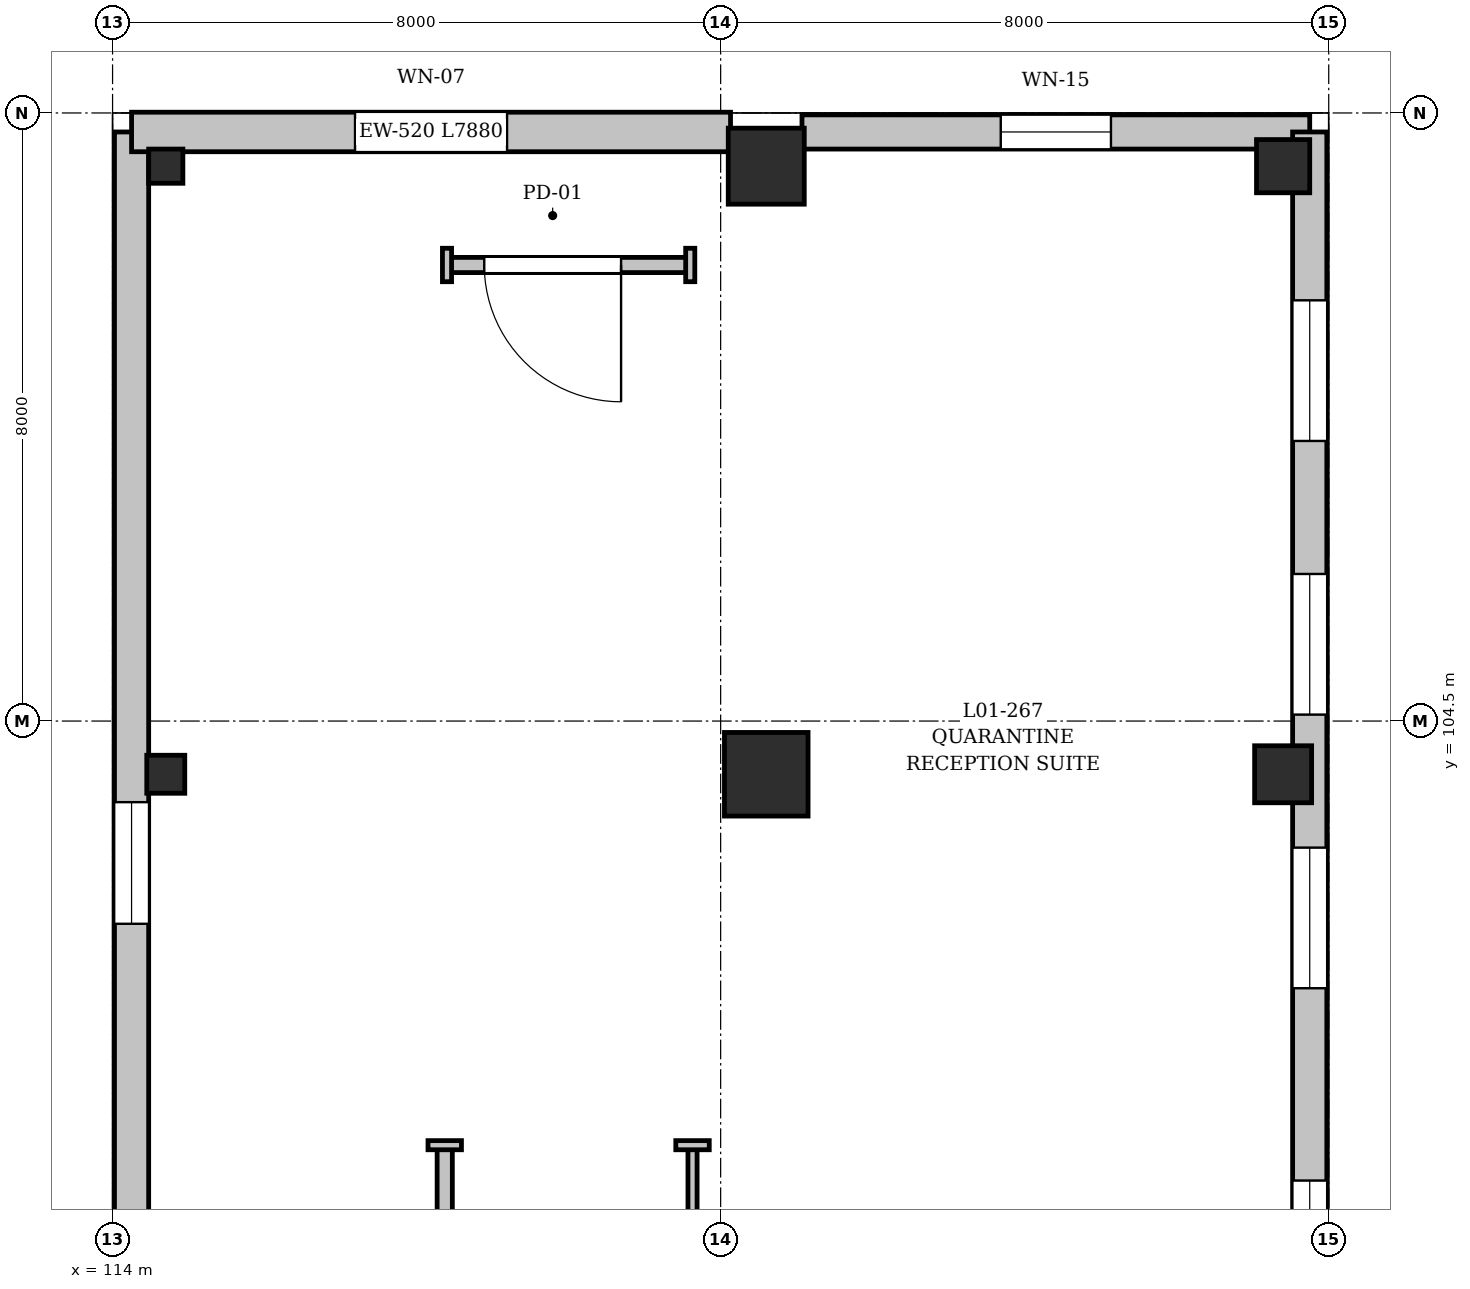
"""IFC4 building model, lengths in metres.
Left out: names, types, materials, properties, quantities, classifications, styles, units other than length and angle.
Written with IfcOpenShell. Run it as: python <this file> out.ifc"""

import sys

from ifc_helpers import new_model, si_unit, direction, frame, frame_2d, origin, origin_2d, place, context, subcontext, project, spatial, rectangle, extrude, element, fill, save


model = new_model("IFC4")
c1 = context("Model", 3, precision=1e-05, world=origin(), true_north=direction((0.0, 1.0)))
c2 = subcontext(c1, "Body", "Model", "MODEL_VIEW")
j1 = project(units=[si_unit("LENGTHUNIT", "METRE"), si_unit("PLANEANGLEUNIT", "RADIAN")], contexts=[c1])
p1 = place(None, origin())
s1 = spatial("IfcSite", under=j1, at=p1, CompositionType="ELEMENT")
p2 = place(p1, origin())
s2 = spatial("IfcBuilding", under=s1, at=p2, CompositionType="ELEMENT")
p3 = place(p2, origin())
s3 = spatial("IfcBuildingStorey", under=s2, at=p3, CompositionType="ELEMENT", Elevation=0.0)
p4 = place(p3, frame((114.7, 103.8, 0.0), z_axis=(0.0, 0.0, 1.0), x_axis=(1.0, 0.0, 0.0)))
e1 = element("IfcColumn", 1, at=p4, inside=s3, PredefinedType="COLUMN", context=c2, shape_type="SweptSolid", body=[
    extrude(rectangle(XDim=0.5, YDim=0.5, at=origin_2d()), origin(), (0.0, 0.0, 1.0), 5.05),
])
p5 = place(p3, frame((114.7, 111.8, 0.0), z_axis=(0.0, 0.0, 1.0), x_axis=(1.0, 0.0, 0.0)))
e2 = element("IfcColumn", 2, at=p5, inside=s3, PredefinedType="COLUMN", context=c2, shape_type="SweptSolid", body=[
    extrude(rectangle(XDim=0.45, YDim=0.45, at=origin_2d()), origin(), (0.0, 0.0, 1.0), 5.05),
])
p6 = place(p3, frame((122.6, 103.8, 0.0), z_axis=(0.0, 0.0, 1.0), x_axis=(1.0, 0.0, 0.0)))
e3 = element("IfcColumn", 3, at=p6, inside=s3, PredefinedType="COLUMN", context=c2, shape_type="SweptSolid", body=[
    extrude(rectangle(XDim=1.1, YDim=1.1, at=origin_2d()), origin(), (0.0, 0.0, 1.0), 5.05),
])
p7 = place(p3, frame((122.6, 111.8, 0.0), z_axis=(0.0, 0.0, 1.0), x_axis=(1.0, 0.0, 0.0)))
e4 = element("IfcColumn", 4, at=p7, inside=s3, PredefinedType="COLUMN", context=c2, shape_type="SweptSolid", body=[
    extrude(rectangle(XDim=1.0, YDim=1.0, at=origin_2d()), origin(), (0.0, 0.0, 1.0), 5.05),
])
p8 = place(p3, frame((129.4, 103.8, 0.0), z_axis=(0.0, 0.0, 1.0), x_axis=(1.0, 0.0, 0.0)))
e5 = element("IfcColumn", 5, at=p8, inside=s3, PredefinedType="COLUMN", context=c2, shape_type="SweptSolid", body=[
    extrude(rectangle(XDim=0.75, YDim=0.75, at=origin_2d()), origin(), (0.0, 0.0, 1.0), 5.05),
])
p9 = place(p3, frame((129.4, 111.8, 0.0), z_axis=(0.0, 0.0, 1.0), x_axis=(1.0, 0.0, 0.0)))
e6 = element("IfcColumn", 6, at=p9, inside=s3, PredefinedType="COLUMN", context=c2, shape_type="SweptSolid", body=[
    extrude(rectangle(XDim=0.7, YDim=0.7, at=origin_2d()), origin(), (0.0, 0.0, 1.0), 5.05),
])
p10 = place(p3, frame((114.25, 82.216, 0.0), z_axis=(0.0, 0.0, 1.0), x_axis=(0.0, 1.0, 0.0)))
e7 = element("IfcWall", 7, at=p10, inside=s3, PredefinedType="SOLIDWALL", context=c2, shape_type="SweptSolid", body=[
    extrude(rectangle(XDim=30.034, YDim=0.45, at=frame_2d((15.017, 0.0))), origin(), (0.0, 0.0, 1.0), 4.04),
])
p11 = place(p10, frame((8.817, 0.0, 0.9)))
e8 = element("IfcOpeningElement", 8, at=p11, cuts=e7, PredefinedType="OPENING", context=c2, shape_type="SweptSolid", body=[
    extrude(rectangle(XDim=1.6, YDim=1.6, at=frame_2d((0.8, 0.8))), frame((0.0, 0.235, 0.0), z_axis=(0.0, -1.0, 0.0), x_axis=(1.0, 0.0, 0.0)), (0.0, 0.0, 1.0), 0.47),
])
p12 = place(p10, frame((12.417, 0.0, 0.9)))
e9 = element("IfcOpeningElement", 9, at=p12, cuts=e7, PredefinedType="OPENING", context=c2, shape_type="SweptSolid", body=[
    extrude(rectangle(XDim=1.6, YDim=1.6, at=frame_2d((0.8, 0.8))), frame((0.0, 0.235, 0.0), z_axis=(0.0, -1.0, 0.0), x_axis=(1.0, 0.0, 0.0)), (0.0, 0.0, 1.0), 0.47),
])
p13 = place(p10, frame((19.617, 0.0, 0.9)))
e10 = element("IfcOpeningElement", 10, at=p13, cuts=e7, PredefinedType="OPENING", context=c2, shape_type="SweptSolid", body=[
    extrude(rectangle(XDim=1.6, YDim=1.6, at=frame_2d((0.8, 0.8))), frame((0.0, 0.235, 0.0), z_axis=(0.0, -1.0, 0.0), x_axis=(1.0, 0.0, 0.0)), (0.0, 0.0, 1.0), 0.47),
])
p14 = place(p3, frame((114.25, 112.25, 0.0), z_axis=(0.0, 0.0, 1.0), x_axis=(1.0, 0.0, 0.0)))
e11 = element("IfcWall", 11, at=p14, inside=s3, PredefinedType="SOLIDWALL", context=c2, shape_type="SweptSolid", body=[
    extrude(rectangle(XDim=7.88, YDim=0.52, at=frame_2d((3.94, 0.0))), origin(), (0.0, 0.0, 1.0), 4.19),
])
p15 = place(p14, frame((2.94, 0.0, 0.9)))
e12 = element("IfcOpeningElement", 12, at=p15, cuts=e11, PredefinedType="OPENING", context=c2, shape_type="SweptSolid", body=[
    extrude(rectangle(XDim=2.0, YDim=1.6, at=frame_2d((1.0, 0.8))), frame((0.0, 0.27, 0.0), z_axis=(0.0, -1.0, 0.0), x_axis=(1.0, 0.0, 0.0)), (0.0, 0.0, 1.0), 0.54),
])
p16 = place(p3, frame((123.07, 112.25, 0.0), z_axis=(0.0, 0.0, 1.0), x_axis=(1.0, 0.0, 0.0)))
e13 = element("IfcWall", 13, at=p16, inside=s3, PredefinedType="SOLIDWALL", context=c2, shape_type="SweptSolid", body=[
    extrude(rectangle(XDim=6.68, YDim=0.45, at=frame_2d((3.34, 0.0))), origin(), (0.0, 0.0, 1.0), 3.94),
])
p17 = place(p16, frame((2.615, 0.0, 0.9)))
e14 = element("IfcOpeningElement", 14, at=p17, cuts=e13, PredefinedType="OPENING", context=c2, shape_type="SweptSolid", body=[
    extrude(rectangle(XDim=1.45, YDim=1.5, at=frame_2d((0.725, 0.75))), frame((0.0, 0.235, 0.0), z_axis=(0.0, -1.0, 0.0), x_axis=(1.0, 0.0, 0.0)), (0.0, 0.0, 1.0), 0.47),
])
p18 = place(p3, frame((129.75, 112.25, 0.0), z_axis=(0.0, 0.0, 1.0), x_axis=(0.0, -1.0, 0.0)))
e15 = element("IfcWall", 15, at=p18, inside=s3, PredefinedType="SOLIDWALL", context=c2, shape_type="SweptSolid", body=[
    extrude(rectangle(XDim=17.08, YDim=0.45, at=frame_2d((8.54, 0.0))), origin(), (0.0, 0.0, 1.0), 3.84),
])
p19 = place(p18, frame((2.215, 0.0, 0.9)))
e16 = element("IfcOpeningElement", 16, at=p19, cuts=e15, PredefinedType="OPENING", context=c2, shape_type="SweptSolid", body=[
    extrude(rectangle(XDim=1.85, YDim=1.5, at=frame_2d((0.925, 0.75))), frame((0.0, 0.235, 0.0), z_axis=(0.0, -1.0, 0.0), x_axis=(1.0, 0.0, 0.0)), (0.0, 0.0, 1.0), 0.47),
])
p20 = place(p18, frame((5.815, 0.0, 0.9)))
e17 = element("IfcOpeningElement", 17, at=p20, cuts=e15, PredefinedType="OPENING", context=c2, shape_type="SweptSolid", body=[
    extrude(rectangle(XDim=1.85, YDim=1.5, at=frame_2d((0.925, 0.75))), frame((0.0, 0.235, 0.0), z_axis=(0.0, -1.0, 0.0), x_axis=(1.0, 0.0, 0.0)), (0.0, 0.0, 1.0), 0.47),
])
p21 = place(p18, frame((9.415, 0.0, 0.9)))
e18 = element("IfcOpeningElement", 18, at=p21, cuts=e15, PredefinedType="OPENING", context=c2, shape_type="SweptSolid", body=[
    extrude(rectangle(XDim=1.85, YDim=1.5, at=frame_2d((0.925, 0.75))), frame((0.0, 0.235, 0.0), z_axis=(0.0, -1.0, 0.0), x_axis=(1.0, 0.0, 0.0)), (0.0, 0.0, 1.0), 0.47),
])
p22 = place(p18, frame((13.795, 0.0, 0.9)))
e19 = element("IfcOpeningElement", 19, at=p22, cuts=e15, PredefinedType="OPENING", context=c2, shape_type="SweptSolid", body=[
    extrude(rectangle(XDim=1.85, YDim=1.5, at=frame_2d((0.925, 0.75))), frame((0.0, 0.235, 0.0), z_axis=(0.0, -1.0, 0.0), x_axis=(1.0, 0.0, 0.0)), (0.0, 0.0, 1.0), 0.47),
])
p23 = place(p3, frame((121.6, 110.5, 0.0), z_axis=(0.0, 0.0, 1.0), x_axis=(-1.0, 0.0, 0.0)))
e20 = element("IfcWall", 20, at=p23, inside=s3, PredefinedType="PARTITIONING", context=c2, shape_type="SweptSolid", body=[
    extrude(rectangle(XDim=3.2, YDim=0.2, at=frame_2d((1.6, 0.0))), origin(), (0.0, 0.0, 1.0), 5.05),
])
p24 = place(p23, frame((0.91, 0.0, 0.0)))
e21 = element("IfcOpeningElement", 21, at=p24, cuts=e20, PredefinedType="OPENING", context=c2, shape_type="SweptSolid", body=[
    extrude(rectangle(XDim=1.8, YDim=2.3, at=frame_2d((0.9, 1.15))), frame((0.0, 0.11, 0.0), z_axis=(0.0, -1.0, 0.0), x_axis=(1.0, 0.0, 0.0)), (0.0, 0.0, 1.0), 0.22),
])
p25 = place(p3, frame((118.37, 86.08, 0.0), z_axis=(0.0, 0.0, 1.0), x_axis=(0.0, 1.0, 0.0)))
e22 = element("IfcWall", 22, at=p25, inside=s3, PredefinedType="PARTITIONING", context=c2, shape_type="SweptSolid", body=[
    extrude(rectangle(XDim=12.84, YDim=0.2, at=frame_2d((6.42, 0.0))), origin(), (0.0, 0.0, 1.0), 4.14),
])
p26 = place(p25, frame((5.97, 0.0, 0.0)))
e23 = element("IfcOpeningElement", 23, at=p26, cuts=e22, PredefinedType="OPENING", context=c2, shape_type="SweptSolid", body=[
    extrude(rectangle(XDim=0.9, YDim=2.1, at=frame_2d((0.45, 1.05))), frame((0.0, 0.11, 0.0), z_axis=(0.0, -1.0, 0.0), x_axis=(1.0, 0.0, 0.0)), (0.0, 0.0, 1.0), 0.22),
])
p27 = place(p3, frame((121.63, 98.92, 0.0), z_axis=(0.0, 0.0, 1.0), x_axis=(0.0, -1.0, 0.0)))
e24 = element("IfcWall", 24, at=p27, inside=s3, PredefinedType="PARTITIONING", context=c2, shape_type="SweptSolid", body=[
    extrude(rectangle(XDim=12.84, YDim=0.12, at=frame_2d((6.42, 0.0))), origin(), (0.0, 0.0, 1.0), 4.14),
])
p28 = place(p27, frame((5.945, 0.0, 0.0)))
e25 = element("IfcOpeningElement", 25, at=p28, cuts=e24, PredefinedType="OPENING", context=c2, shape_type="SweptSolid", body=[
    extrude(rectangle(XDim=0.95, YDim=2.2, at=frame_2d((0.475, 1.1))), frame((0.0, 0.07, 0.0), z_axis=(0.0, -1.0, 0.0), x_axis=(1.0, 0.0, 0.0)), (0.0, 0.0, 1.0), 0.14),
])
for number, where, z_axis, x_axis in (
    (26, (121.6, 110.72, 0.0), (0.0, 0.0, 1.0), (0.0, -1.0, 0.0)),
    (27, (118.4, 110.72, 0.0), (0.0, 0.0, 1.0), (0.0, -1.0, 0.0)),
):
    element("IfcWall", number, at=place(p3, frame(where, z_axis=z_axis, x_axis=x_axis)), inside=s3, PredefinedType="PARTITIONING", context=c2, shape_type="SweptSolid", body=[
        extrude(rectangle(XDim=0.44, YDim=0.12, at=frame_2d((0.22, 0.0))), origin(), (0.0, 0.0, 1.0), 5.05),
    ])
for number, where, z_axis, x_axis in (
    (28, (118.59, 98.92, 0.0), (0.0, 0.0, 1.0), (-1.0, 0.0, 0.0)),
    (29, (121.41, 98.92, 0.0), (0.0, 0.0, 1.0), (1.0, 0.0, 0.0)),
):
    element("IfcWall", number, at=place(p3, frame(where, z_axis=z_axis, x_axis=x_axis)), inside=s3, PredefinedType="PARTITIONING", context=c2, shape_type="SweptSolid", body=[
        extrude(rectangle(XDim=0.44, YDim=0.12, at=frame_2d((0.22, 0.0))), origin(), (0.0, 0.0, 1.0), 5.05),
    ])
p29 = place(p13, origin())
e30 = element("IfcWindow", 30, at=p29, inside=s3, PartitioningType="DOUBLE_PANEL_VERTICAL", PredefinedType="WINDOW", context=c2, shape_type="SweptSolid", body=[
    extrude(rectangle(XDim=1.6, YDim=1.6, at=frame_2d((0.8, 0.8))), frame((0.0, 0.03, 0.0), z_axis=(0.0, -1.0, 0.0), x_axis=(1.0, 0.0, 0.0)), (0.0, 0.0, 1.0), 0.06),
])
fill(e10, e30)
p30 = place(p15, origin())
e31 = element("IfcWindow", 31, at=p30, inside=s3, PartitioningType="TRIPLE_PANEL_VERTICAL", PredefinedType="WINDOW", context=c2, shape_type="SweptSolid", body=[
    extrude(rectangle(XDim=2.0, YDim=1.6, at=frame_2d((1.0, 0.8))), frame((0.0, 0.03, 0.0), z_axis=(0.0, -1.0, 0.0), x_axis=(1.0, 0.0, 0.0)), (0.0, 0.0, 1.0), 0.06),
])
fill(e12, e31)
p31 = place(p17, origin())
e32 = element("IfcWindow", 32, at=p31, inside=s3, PartitioningType="DOUBLE_PANEL_VERTICAL", PredefinedType="WINDOW", context=c2, shape_type="SweptSolid", body=[
    extrude(rectangle(XDim=1.45, YDim=1.5, at=frame_2d((0.725, 0.75))), frame((0.0, 0.03, 0.0), z_axis=(0.0, -1.0, 0.0), x_axis=(1.0, 0.0, 0.0)), (0.0, 0.0, 1.0), 0.06),
])
fill(e14, e32)
p32 = place(p19, origin())
e33 = element("IfcWindow", 33, at=p32, inside=s3, PartitioningType="DOUBLE_PANEL_VERTICAL", PredefinedType="WINDOW", context=c2, shape_type="SweptSolid", body=[
    extrude(rectangle(XDim=1.85, YDim=1.5, at=frame_2d((0.925, 0.75))), frame((0.0, 0.03, 0.0), z_axis=(0.0, -1.0, 0.0), x_axis=(1.0, 0.0, 0.0)), (0.0, 0.0, 1.0), 0.06),
])
fill(e16, e33)
p33 = place(p20, origin())
e34 = element("IfcWindow", 34, at=p33, inside=s3, PartitioningType="DOUBLE_PANEL_VERTICAL", PredefinedType="WINDOW", context=c2, shape_type="SweptSolid", body=[
    extrude(rectangle(XDim=1.85, YDim=1.5, at=frame_2d((0.925, 0.75))), frame((0.0, 0.03, 0.0), z_axis=(0.0, -1.0, 0.0), x_axis=(1.0, 0.0, 0.0)), (0.0, 0.0, 1.0), 0.06),
])
fill(e17, e34)
p34 = place(p21, origin())
e35 = element("IfcWindow", 35, at=p34, inside=s3, PartitioningType="DOUBLE_PANEL_VERTICAL", PredefinedType="WINDOW", context=c2, shape_type="SweptSolid", body=[
    extrude(rectangle(XDim=1.85, YDim=1.5, at=frame_2d((0.925, 0.75))), frame((0.0, 0.03, 0.0), z_axis=(0.0, -1.0, 0.0), x_axis=(1.0, 0.0, 0.0)), (0.0, 0.0, 1.0), 0.06),
])
fill(e18, e35)
p35 = place(p22, origin())
e36 = element("IfcWindow", 36, at=p35, inside=s3, PartitioningType="DOUBLE_PANEL_VERTICAL", PredefinedType="WINDOW", context=c2, shape_type="SweptSolid", body=[
    extrude(rectangle(XDim=1.85, YDim=1.5, at=frame_2d((0.925, 0.75))), frame((0.0, 0.03, 0.0), z_axis=(0.0, -1.0, 0.0), x_axis=(1.0, 0.0, 0.0)), (0.0, 0.0, 1.0), 0.06),
])
fill(e19, e36)
p36 = place(p24, origin())
e37 = element("IfcDoor", 37, at=p36, inside=s3, OperationType="DOUBLE_DOOR_SINGLE_SWING", PredefinedType="DOOR", context=c2, shape_type="SweptSolid", body=[
    extrude(rectangle(XDim=1.8, YDim=2.3, at=frame_2d((0.9, 1.15))), frame((0.0, 0.025, 0.0), z_axis=(0.0, -1.0, 0.0), x_axis=(1.0, 0.0, 0.0)), (0.0, 0.0, 1.0), 0.05),
])
fill(e21, e37)
save(model, sys.argv[1])
